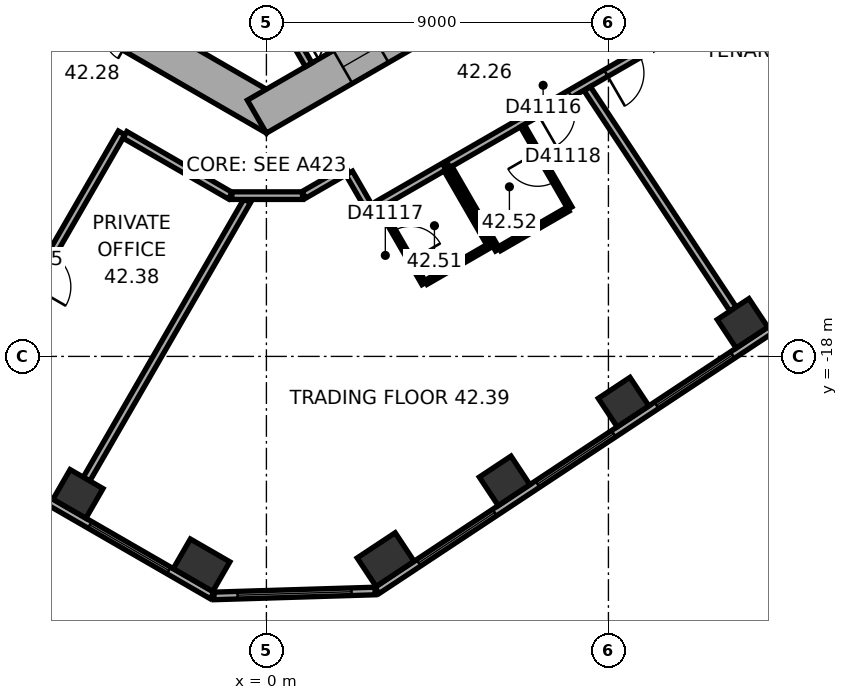
"""IFC4 building model, lengths in metres.
Left out: names, types, materials, properties, quantities, classifications, styles, units other than length and angle.
Written with IfcOpenShell. Run it as: python <this file> out.ifc"""

import sys

from ifc_helpers import new_model, si_unit, direction, frame, frame_2d, origin, origin_2d, place, context, subcontext, project, spatial, rectangle, extrude, element, fill, save


model = new_model("IFC4")
c1 = context("Model", 3, precision=1e-05, world=origin(), true_north=direction((0.0, 1.0)))
c2 = subcontext(c1, "Body", "Model", "MODEL_VIEW")
j1 = project(units=[si_unit("LENGTHUNIT", "METRE"), si_unit("PLANEANGLEUNIT", "RADIAN")], contexts=[c1])
p1 = place(None, origin())
s1 = spatial("IfcSite", under=j1, at=p1, CompositionType="ELEMENT")
p2 = place(p1, origin())
s2 = spatial("IfcBuilding", under=s1, at=p2, CompositionType="ELEMENT")
p3 = place(p2, frame((0.0, 0.0, 172.5)))
s3 = spatial("IfcBuildingStorey", under=s2, at=p3, CompositionType="ELEMENT", Elevation=172.5)
p4 = place(p3, frame((-4.958, -21.617, 0.0), z_axis=(0.0, 0.0, 1.0), x_axis=(0.866025403784, -0.5, 0.0)))
e1 = element("IfcColumn", 1, at=p4, inside=s3, PredefinedType="COLUMN", context=c2, shape_type="SweptSolid", body=[
    extrude(rectangle(XDim=1.0, YDim=0.9, at=origin_2d()), origin(), (0.0, 0.0, 1.0), 3.7),
])
for number, where, z_axis, x_axis in (
    (2, (-1.706, -23.494, 0.0), (0.0, 0.0, 1.0), (0.866, -0.5, 0.0)),
    (3, (3.137, -23.346, 0.0), (0.0, 0.0, 1.0), (0.834, 0.552, 0.0)),
):
    element("IfcColumn", number, at=place(p3, frame(where, z_axis=z_axis, x_axis=x_axis)), inside=s3, PredefinedType="COLUMN", context=c2, shape_type="SweptSolid", body=[
        extrude(rectangle(XDim=1.2, YDim=0.9, at=origin_2d()), origin(), (0.0, 0.0, 1.0), 3.7),
    ])
for number, where, z_axis, x_axis in (
    (4, (6.268, -21.274, 0.0), (0.0, 0.0, 1.0), (0.834, 0.552, 0.0)),
    (5, (9.398, -19.202, 0.0), (0.0, 0.0, 1.0), (0.834, 0.552, 0.0)),
    (6, (12.529, -17.13, 0.0), (0.0, 0.0, 1.0), (0.834, 0.552, 0.0)),
):
    element("IfcColumn", number, at=place(p3, frame(where, z_axis=z_axis, x_axis=x_axis)), inside=s3, PredefinedType="COLUMN", context=c2, shape_type="SweptSolid", body=[
        extrude(rectangle(XDim=1.0, YDim=0.9, at=origin_2d()), origin(), (0.0, 0.0, 1.0), 3.7),
    ])
p5 = place(p3, frame((-10.25, -5.629, 0.0), z_axis=(0.0, 0.0, 1.0), x_axis=(0.866022616891, -0.50000482701, 0.0)))
e7 = element("IfcWall", 7, at=p5, inside=s3, PredefinedType="SHEAR", context=c2, shape_type="SweptSolid", body=[
    extrude(rectangle(XDim=12.125, YDim=1.0, at=frame_2d((6.062, 0.0))), origin(), (0.0, 0.0, 1.0), 3.7),
])
p6 = place(p5, frame((6.262, 0.0, 0.0)))
e8 = element("IfcOpeningElement", 8, at=p6, cuts=e7, PredefinedType="OPENING", context=c2, shape_type="SweptSolid", body=[
    extrude(rectangle(XDim=1.5, YDim=2.1, at=frame_2d((0.75, 1.05))), frame((0.0, 0.51, 0.0), z_axis=(0.0, -1.0, 0.0), x_axis=(1.0, 0.0, 0.0)), (0.0, 0.0, 1.0), 1.02),
])
p7 = place(p5, frame((1.712, 0.0, 0.0)))
e9 = element("IfcOpeningElement", 9, at=p7, cuts=e7, PredefinedType="OPENING", context=c2, shape_type="SweptSolid", body=[
    extrude(rectangle(XDim=1.1, YDim=2.1, at=frame_2d((0.55, 1.05))), frame((0.0, 0.51, 0.0), z_axis=(0.0, -1.0, 0.0), x_axis=(1.0, 0.0, 0.0)), (0.0, 0.0, 1.0), 1.02),
])
p8 = place(p5, frame((4.312, 0.0, 0.0)))
e10 = element("IfcOpeningElement", 10, at=p8, cuts=e7, PredefinedType="OPENING", context=c2, shape_type="SweptSolid", body=[
    extrude(rectangle(XDim=1.1, YDim=2.1, at=frame_2d((0.55, 1.05))), frame((0.0, 0.51, 0.0), z_axis=(0.0, -1.0, 0.0), x_axis=(1.0, 0.0, 0.0)), (0.0, 0.0, 1.0), 1.02),
])
p9 = place(p3, frame((-0.25, -11.691, 0.0), z_axis=(0.0, 0.0, 1.0), x_axis=(0.866022616891, 0.50000482701, 0.0)))
e11 = element("IfcWall", 11, at=p9, inside=s3, PredefinedType="SHEAR", context=c2, shape_type="SweptSolid", body=[
    extrude(rectangle(XDim=12.125, YDim=1.0, at=frame_2d((6.062, 0.0))), origin(), (0.0, 0.0, 1.0), 3.7),
])
p10 = place(p9, frame((2.612, 0.0, 0.0)))
e12 = element("IfcOpeningElement", 12, at=p10, cuts=e11, PredefinedType="OPENING", context=c2, shape_type="SweptSolid", body=[
    extrude(rectangle(XDim=1.1, YDim=2.1, at=frame_2d((0.55, 1.05))), frame((0.0, 0.51, 0.0), z_axis=(0.0, -1.0, 0.0), x_axis=(1.0, 0.0, 0.0)), (0.0, 0.0, 1.0), 1.02),
])
p11 = place(p9, frame((5.212, 0.0, 0.0)))
e13 = element("IfcOpeningElement", 13, at=p11, cuts=e11, PredefinedType="OPENING", context=c2, shape_type="SweptSolid", body=[
    extrude(rectangle(XDim=1.1, YDim=2.1, at=frame_2d((0.55, 1.05))), frame((0.0, 0.51, 0.0), z_axis=(0.0, -1.0, 0.0), x_axis=(1.0, 0.0, 0.0)), (0.0, 0.0, 1.0), 1.02),
])
p12 = place(p9, frame((7.812, 0.0, 0.0)))
e14 = element("IfcOpeningElement", 14, at=p12, cuts=e11, PredefinedType="OPENING", context=c2, shape_type="SweptSolid", body=[
    extrude(rectangle(XDim=1.1, YDim=2.1, at=frame_2d((0.55, 1.05))), frame((0.0, 0.51, 0.0), z_axis=(0.0, -1.0, 0.0), x_axis=(1.0, 0.0, 0.0)), (0.0, 0.0, 1.0), 1.02),
])
p13 = place(p3, frame((-18.789, -14.267, 0.0), z_axis=(0.0, 0.0, 1.0), x_axis=(0.866023315909, -0.500003616288, 0.0)))
e15 = element("IfcWall", 15, at=p13, inside=s3, PredefinedType="STANDARD", context=c2, shape_type="SweptSolid", body=[
    extrude(rectangle(XDim=20.044, YDim=0.2, at=frame_2d((10.022, 0.0))), origin(), (0.0, 0.0, 1.0), 3.7),
])
p14 = place(p13, frame((1.314, 0.0, 0.9)))
e16 = element("IfcOpeningElement", 16, at=p14, cuts=e15, PredefinedType="OPENING", context=c2, shape_type="SweptSolid", body=[
    extrude(rectangle(XDim=2.4, YDim=2.0, at=frame_2d((1.2, 1.0))), frame((0.0, 0.11, 0.0), z_axis=(0.0, -1.0, 0.0), x_axis=(1.0, 0.0, 0.0)), (0.0, 0.0, 1.0), 0.22),
])
p15 = place(p13, frame((5.069, 0.0, 0.9)))
e17 = element("IfcOpeningElement", 17, at=p15, cuts=e15, PredefinedType="OPENING", context=c2, shape_type="SweptSolid", body=[
    extrude(rectangle(XDim=2.4, YDim=2.0, at=frame_2d((1.2, 1.0))), frame((0.0, 0.11, 0.0), z_axis=(0.0, -1.0, 0.0), x_axis=(1.0, 0.0, 0.0)), (0.0, 0.0, 1.0), 0.22),
])
p16 = place(p13, frame((8.823, 0.0, 0.9)))
e18 = element("IfcOpeningElement", 18, at=p16, cuts=e15, PredefinedType="OPENING", context=c2, shape_type="SweptSolid", body=[
    extrude(rectangle(XDim=2.4, YDim=2.0, at=frame_2d((1.2, 1.0))), frame((0.0, 0.11, 0.0), z_axis=(0.0, -1.0, 0.0), x_axis=(1.0, 0.0, 0.0)), (0.0, 0.0, 1.0), 0.22),
])
p17 = place(p13, frame((12.577, 0.0, 0.9)))
e19 = element("IfcOpeningElement", 19, at=p17, cuts=e15, PredefinedType="OPENING", context=c2, shape_type="SweptSolid", body=[
    extrude(rectangle(XDim=2.4, YDim=2.0, at=frame_2d((1.2, 1.0))), frame((0.0, 0.11, 0.0), z_axis=(0.0, -1.0, 0.0), x_axis=(1.0, 0.0, 0.0)), (0.0, 0.0, 1.0), 0.22),
])
p18 = place(p13, frame((16.331, 0.0, 0.9)))
e20 = element("IfcOpeningElement", 20, at=p18, cuts=e15, PredefinedType="OPENING", context=c2, shape_type="SweptSolid", body=[
    extrude(rectangle(XDim=2.4, YDim=2.0, at=frame_2d((1.2, 1.0))), frame((0.0, 0.11, 0.0), z_axis=(0.0, -1.0, 0.0), x_axis=(1.0, 0.0, 0.0)), (0.0, 0.0, 1.0), 0.22),
])
p19 = place(p3, frame((-1.378, -24.302, 0.0), z_axis=(0.0, 0.0, 1.0), x_axis=(0.999533857267, 0.030529791629, 0.0)))
e21 = element("IfcWall", 21, at=p19, inside=s3, PredefinedType="STANDARD", context=c2, shape_type="SweptSolid", body=[
    extrude(rectangle(XDim=4.238, YDim=0.2, at=frame_2d((2.119, 0.0))), origin(), (0.0, 0.0, 1.0), 3.7),
])
p20 = place(p19, frame((0.619, 0.0, 0.9)))
e22 = element("IfcOpeningElement", 22, at=p20, cuts=e21, PredefinedType="OPENING", context=c2, shape_type="SweptSolid", body=[
    extrude(rectangle(XDim=3.0, YDim=2.0, at=frame_2d((1.5, 1.0))), frame((0.0, 0.11, 0.0), z_axis=(0.0, -1.0, 0.0), x_axis=(1.0, 0.0, 0.0)), (0.0, 0.0, 1.0), 0.22),
])
p21 = place(p3, frame((2.911, -24.156, 0.0), z_axis=(0.0, 0.0, 1.0), x_axis=(0.833882163564, 0.551942512668, 0.0)))
e23 = element("IfcWall", 23, at=p21, inside=s3, PredefinedType="STANDARD", context=c2, shape_type="SweptSolid", body=[
    extrude(rectangle(XDim=20.044, YDim=0.2, at=frame_2d((10.022, 0.0))), origin(), (0.0, 0.0, 1.0), 3.7),
])
p22 = place(p21, frame((1.313, 0.0, 0.9)))
e24 = element("IfcOpeningElement", 24, at=p22, cuts=e23, PredefinedType="OPENING", context=c2, shape_type="SweptSolid", body=[
    extrude(rectangle(XDim=2.4, YDim=2.0, at=frame_2d((1.2, 1.0))), frame((0.0, 0.11, 0.0), z_axis=(0.0, -1.0, 0.0), x_axis=(1.0, 0.0, 0.0)), (0.0, 0.0, 1.0), 0.22),
])
p23 = place(p21, frame((5.067, 0.0, 0.9)))
e25 = element("IfcOpeningElement", 25, at=p23, cuts=e23, PredefinedType="OPENING", context=c2, shape_type="SweptSolid", body=[
    extrude(rectangle(XDim=2.4, YDim=2.0, at=frame_2d((1.2, 1.0))), frame((0.0, 0.11, 0.0), z_axis=(0.0, -1.0, 0.0), x_axis=(1.0, 0.0, 0.0)), (0.0, 0.0, 1.0), 0.22),
])
p24 = place(p21, frame((8.821, 0.0, 0.9)))
e26 = element("IfcOpeningElement", 26, at=p24, cuts=e23, PredefinedType="OPENING", context=c2, shape_type="SweptSolid", body=[
    extrude(rectangle(XDim=2.4, YDim=2.0, at=frame_2d((1.2, 1.0))), frame((0.0, 0.11, 0.0), z_axis=(0.0, -1.0, 0.0), x_axis=(1.0, 0.0, 0.0)), (0.0, 0.0, 1.0), 0.22),
])
p25 = place(p21, frame((12.575, 0.0, 0.9)))
e27 = element("IfcOpeningElement", 27, at=p25, cuts=e23, PredefinedType="OPENING", context=c2, shape_type="SweptSolid", body=[
    extrude(rectangle(XDim=2.4, YDim=2.0, at=frame_2d((1.2, 1.0))), frame((0.0, 0.11, 0.0), z_axis=(0.0, -1.0, 0.0), x_axis=(1.0, 0.0, 0.0)), (0.0, 0.0, 1.0), 0.22),
])
p26 = place(p21, frame((16.329, 0.0, 0.9)))
e28 = element("IfcOpeningElement", 28, at=p26, cuts=e23, PredefinedType="OPENING", context=c2, shape_type="SweptSolid", body=[
    extrude(rectangle(XDim=2.4, YDim=2.0, at=frame_2d((1.2, 1.0))), frame((0.0, 0.11, 0.0), z_axis=(0.0, -1.0, 0.0), x_axis=(1.0, 0.0, 0.0)), (0.0, 0.0, 1.0), 0.22),
])
p27 = place(p3, frame((0.013, -8.422, 0.0), z_axis=(0.0, 0.0, 1.0), x_axis=(0.500077893725, -0.86598042715, 0.0)))
e29 = element("IfcWall", 29, at=p27, inside=s3, PredefinedType="PARTITIONING", context=c2, shape_type="SweptSolid", body=[
    extrude(rectangle(XDim=2.2, YDim=0.2, at=frame_2d((1.1, 0.0))), origin(), (0.0, 0.0, 1.0), 3.42),
])
p28 = place(p3, frame((-7.984, -19.351, 0.0), z_axis=(0.0, 0.0, 1.0), x_axis=(0.500010139422, 0.866019549707, 0.0)))
e30 = element("IfcWall", 30, at=p28, inside=s3, PredefinedType="PARTITIONING", context=c2, shape_type="SweptSolid", body=[
    extrude(rectangle(XDim=8.35, YDim=0.2, at=frame_2d((4.175, 0.0))), origin(), (0.0, 0.0, 1.0), 3.42),
])
p29 = place(p28, frame((3.675, 0.0, 0.0)))
e31 = element("IfcOpeningElement", 31, at=p29, cuts=e30, PredefinedType="OPENING", context=c2, shape_type="SweptSolid", body=[
    extrude(rectangle(XDim=1.0, YDim=2.1, at=frame_2d((0.5, 1.05))), frame((0.0, 0.11, 0.0), z_axis=(0.0, -1.0, 0.0), x_axis=(1.0, 0.0, 0.0)), (0.0, 0.0, 1.0), 0.22),
])
p30 = place(p3, frame((-4.732, -21.228, 0.0), z_axis=(0.0, 0.0, 1.0), x_axis=(0.500000843414, 0.866024916838, 0.0)))
e32 = element("IfcWall", 32, at=p30, inside=s3, PredefinedType="PARTITIONING", context=c2, shape_type="SweptSolid", body=[
    extrude(rectangle(XDim=8.452, YDim=0.2, at=frame_2d((4.226, 0.0))), origin(), (0.0, 0.0, 1.0), 3.42),
])
p31 = place(p3, frame((-3.722, -12.169, 0.0), z_axis=(0.0, 0.0, 1.0), x_axis=(0.866033163891, -0.499986558861, 0.0)))
e33 = element("IfcWall", 33, at=p31, inside=s3, PredefinedType="PARTITIONING", context=c2, shape_type="SweptSolid", body=[
    extrude(rectangle(XDim=3.201, YDim=0.2, at=frame_2d((1.6, 0.0))), origin(), (0.0, 0.0, 1.0), 3.42),
])
p32 = place(p3, frame((-0.91, -13.77, 0.0), z_axis=(0.0, 0.0, 1.0), x_axis=(1.0, 0.0, 0.0)))
e34 = element("IfcWall", 34, at=p32, inside=s3, PredefinedType="PARTITIONING", context=c2, shape_type="SweptSolid", body=[
    extrude(rectangle(XDim=1.86, YDim=0.2, at=frame_2d((0.93, 0.0))), origin(), (0.0, 0.0, 1.0), 3.42),
])
p33 = place(p3, frame((0.985, -13.75, 0.0), z_axis=(0.0, 0.0, 1.0), x_axis=(0.866028661061, 0.499994358189, 0.0)))
e35 = element("IfcWall", 35, at=p33, inside=s3, PredefinedType="PARTITIONING", context=c2, shape_type="SweptSolid", body=[
    extrude(rectangle(XDim=1.321, YDim=0.2, at=frame_2d((0.661, 0.0))), origin(), (0.0, 0.0, 1.0), 3.42),
])
p34 = place(p3, frame((2.179, -13.176, 0.0), z_axis=(0.0, 0.0, 1.0), x_axis=(0.499978356969, -0.866037899034, 0.0)))
e36 = element("IfcWall", 36, at=p34, inside=s3, PredefinedType="PARTITIONING", context=c2, shape_type="SweptSolid", body=[
    extrude(rectangle(XDim=1.101, YDim=0.2, at=frame_2d((0.551, 0.0))), origin(), (0.0, 0.0, 1.0), 3.42),
])
p35 = place(p3, frame((2.946, -14.004, 0.0), z_axis=(0.0, 0.0, 1.0), x_axis=(0.866041268327, 0.499972520799, 0.0)))
e37 = element("IfcWall", 37, at=p35, inside=s3, PredefinedType="PARTITIONING", context=c2, shape_type="SweptSolid", body=[
    extrude(rectangle(XDim=2.0, YDim=0.2, at=frame_2d((1.0, 0.0))), origin(), (0.0, 0.0, 1.0), 3.42),
])
p36 = place(p3, frame((4.146, -16.083, 0.0), z_axis=(0.0, 0.0, 1.0), x_axis=(-0.499952165731, 0.866053019151, 0.0)))
e38 = element("IfcWall", 38, at=p36, inside=s3, PredefinedType="PARTITIONING", context=c2, shape_type="SweptSolid", body=[
    extrude(rectangle(XDim=2.3, YDim=0.12, at=frame_2d((1.15, 0.0))), origin(), (0.0, 0.0, 1.0), 3.42),
])
p37 = place(p36, frame((0.7, 0.0, 0.0)))
e39 = element("IfcOpeningElement", 39, at=p37, cuts=e38, PredefinedType="OPENING", context=c2, shape_type="SweptSolid", body=[
    extrude(rectangle(XDim=0.9, YDim=2.1, at=frame_2d((0.45, 1.05))), frame((0.0, 0.07, 0.0), z_axis=(0.0, -1.0, 0.0), x_axis=(1.0, 0.0, 0.0)), (0.0, 0.0, 1.0), 0.14),
])
p38 = place(p3, frame((4.728, -13.091, 0.0), z_axis=(0.0, 0.0, 1.0), x_axis=(0.500031774688, -0.866007057882, 0.0)))
e40 = element("IfcWall", 40, at=p38, inside=s3, PredefinedType="PARTITIONING", context=c2, shape_type="SweptSolid", body=[
    extrude(rectangle(XDim=2.3, YDim=0.12, at=frame_2d((1.15, 0.0))), origin(), (0.0, 0.0, 1.0), 3.42),
])
p39 = place(p3, frame((4.782, -12.944, 0.0), z_axis=(0.0, 0.0, 1.0), x_axis=(0.866022506829, 0.50000501764, 0.0)))
e41 = element("IfcWall", 41, at=p39, inside=s3, PredefinedType="PARTITIONING", context=c2, shape_type="SweptSolid", body=[
    extrude(rectangle(XDim=6.432, YDim=0.2, at=frame_2d((3.216, 0.0))), origin(), (0.0, 0.0, 1.0), 3.42),
])
p40 = place(p39, frame((2.704, 0.0, 0.0)))
e42 = element("IfcOpeningElement", 42, at=p40, cuts=e41, PredefinedType="OPENING", context=c2, shape_type="SweptSolid", body=[
    extrude(rectangle(XDim=1.0, YDim=2.1, at=frame_2d((0.5, 1.05))), frame((0.0, 0.11, 0.0), z_axis=(0.0, -1.0, 0.0), x_axis=(1.0, 0.0, 0.0)), (0.0, 0.0, 1.0), 0.22),
])
p41 = place(p39, frame((4.795, 0.0, 0.0)))
e43 = element("IfcOpeningElement", 43, at=p41, cuts=e41, PredefinedType="OPENING", context=c2, shape_type="SweptSolid", body=[
    extrude(rectangle(XDim=1.0, YDim=2.1, at=frame_2d((0.5, 1.05))), frame((0.0, 0.11, 0.0), z_axis=(0.0, -1.0, 0.0), x_axis=(1.0, 0.0, 0.0)), (0.0, 0.0, 1.0), 0.22),
])
p42 = place(p3, frame((5.826, -15.113, 0.0), z_axis=(0.0, 0.0, 1.0), x_axis=(-0.866045024864, -0.499966013754, 0.0)))
e44 = element("IfcWall", 44, at=p42, inside=s3, PredefinedType="PARTITIONING", context=c2, shape_type="SweptSolid", body=[
    extrude(rectangle(XDim=1.88, YDim=0.12, at=frame_2d((0.94, 0.0))), origin(), (0.0, 0.0, 1.0), 3.42),
])
p43 = place(p3, frame((6.082, -15.196, 0.0), z_axis=(0.0, 0.0, 1.0), x_axis=(-0.500004234368, 0.866022959057, 0.0)))
e45 = element("IfcWall", 45, at=p43, inside=s3, PredefinedType="PARTITIONING", context=c2, shape_type="SweptSolid", body=[
    extrude(rectangle(XDim=2.5, YDim=0.12, at=frame_2d((1.25, 0.0))), origin(), (0.0, 0.0, 1.0), 3.42),
])
p44 = place(p3, frame((6.737, -11.931, 0.0), z_axis=(0.0, 0.0, 1.0), x_axis=(0.500004234368, -0.866022959057, 0.0)))
e46 = element("IfcWall", 46, at=p44, inside=s3, PredefinedType="PARTITIONING", context=c2, shape_type="SweptSolid", body=[
    extrude(rectangle(XDim=2.5, YDim=0.12, at=frame_2d((1.25, 0.0))), origin(), (0.0, 0.0, 1.0), 3.42),
])
p45 = place(p44, frame((0.8, 0.0, 0.0)))
e47 = element("IfcOpeningElement", 47, at=p45, cuts=e46, PredefinedType="OPENING", context=c2, shape_type="SweptSolid", body=[
    extrude(rectangle(XDim=0.9, YDim=2.1, at=frame_2d((0.45, 1.05))), frame((0.0, 0.07, 0.0), z_axis=(0.0, -1.0, 0.0), x_axis=(1.0, 0.0, 0.0)), (0.0, 0.0, 1.0), 0.14),
])
p46 = place(p3, frame((7.935, -14.126, 0.0), z_axis=(0.0, 0.0, 1.0), x_axis=(-0.866009661879, -0.500027264788, 0.0)))
e48 = element("IfcWall", 48, at=p46, inside=s3, PredefinedType="PARTITIONING", context=c2, shape_type="SweptSolid", body=[
    extrude(rectangle(XDim=2.08, YDim=0.12, at=frame_2d((1.04, 0.0))), origin(), (0.0, 0.0, 1.0), 3.42),
])
p47 = place(p3, frame((12.281, -16.755, 0.0), z_axis=(0.0, 0.0, 1.0), x_axis=(-0.551925794663, 0.833893228888, 0.0)))
e49 = element("IfcWall", 49, at=p47, inside=s3, PredefinedType="PARTITIONING", context=c2, shape_type="SweptSolid", body=[
    extrude(rectangle(XDim=6.953, YDim=0.2, at=frame_2d((3.476, 0.0))), origin(), (0.0, 0.0, 1.0), 3.42),
])
p48 = place(p18, origin())
e50 = element("IfcWindow", 50, at=p48, inside=s3, PartitioningType="SINGLE_PANEL", PredefinedType="WINDOW", context=c2, shape_type="SweptSolid", body=[
    extrude(rectangle(XDim=2.4, YDim=2.0, at=frame_2d((1.2, 1.0))), frame((0.0, 0.03, 0.0), z_axis=(0.0, -1.0, 0.0), x_axis=(1.0, 0.0, 0.0)), (0.0, 0.0, 1.0), 0.06),
])
fill(e20, e50)
p49 = place(p20, origin())
e51 = element("IfcWindow", 51, at=p49, inside=s3, PartitioningType="SINGLE_PANEL", PredefinedType="WINDOW", context=c2, shape_type="SweptSolid", body=[
    extrude(rectangle(XDim=3.0, YDim=2.0, at=frame_2d((1.5, 1.0))), frame((0.0, 0.03, 0.0), z_axis=(0.0, -1.0, 0.0), x_axis=(1.0, 0.0, 0.0)), (0.0, 0.0, 1.0), 0.06),
])
fill(e22, e51)
p50 = place(p22, origin())
e52 = element("IfcWindow", 52, at=p50, inside=s3, PartitioningType="SINGLE_PANEL", PredefinedType="WINDOW", context=c2, shape_type="SweptSolid", body=[
    extrude(rectangle(XDim=2.4, YDim=2.0, at=frame_2d((1.2, 1.0))), frame((0.0, 0.03, 0.0), z_axis=(0.0, -1.0, 0.0), x_axis=(1.0, 0.0, 0.0)), (0.0, 0.0, 1.0), 0.06),
])
fill(e24, e52)
p51 = place(p23, origin())
e53 = element("IfcWindow", 53, at=p51, inside=s3, PartitioningType="SINGLE_PANEL", PredefinedType="WINDOW", context=c2, shape_type="SweptSolid", body=[
    extrude(rectangle(XDim=2.4, YDim=2.0, at=frame_2d((1.2, 1.0))), frame((0.0, 0.03, 0.0), z_axis=(0.0, -1.0, 0.0), x_axis=(1.0, 0.0, 0.0)), (0.0, 0.0, 1.0), 0.06),
])
fill(e25, e53)
p52 = place(p24, origin())
e54 = element("IfcWindow", 54, at=p52, inside=s3, PartitioningType="SINGLE_PANEL", PredefinedType="WINDOW", context=c2, shape_type="SweptSolid", body=[
    extrude(rectangle(XDim=2.4, YDim=2.0, at=frame_2d((1.2, 1.0))), frame((0.0, 0.03, 0.0), z_axis=(0.0, -1.0, 0.0), x_axis=(1.0, 0.0, 0.0)), (0.0, 0.0, 1.0), 0.06),
])
fill(e26, e54)
p53 = place(p10, origin())
e55 = element("IfcDoor", 55, at=p53, inside=s3, OperationType="DOUBLE_DOOR_SLIDING", PredefinedType="DOOR", context=c2, shape_type="SweptSolid", body=[
    extrude(rectangle(XDim=1.1, YDim=2.1, at=frame_2d((0.55, 1.05))), frame((0.0, 0.025, 0.0), z_axis=(0.0, -1.0, 0.0), x_axis=(1.0, 0.0, 0.0)), (0.0, 0.0, 1.0), 0.05),
])
fill(e12, e55)
p54 = place(p29, origin())
e56 = element("IfcDoor", 56, at=p54, inside=s3, OperationType="SINGLE_SWING_LEFT", PredefinedType="DOOR", context=c2, shape_type="SweptSolid", body=[
    extrude(rectangle(XDim=1.0, YDim=2.1, at=frame_2d((0.5, 1.05))), frame((0.0, 0.025, 0.0), z_axis=(0.0, -1.0, 0.0), x_axis=(1.0, 0.0, 0.0)), (0.0, 0.0, 1.0), 0.05),
])
fill(e31, e56)
p55 = place(p40, origin())
e57 = element("IfcDoor", 57, at=p55, inside=s3, OperationType="SINGLE_SWING_LEFT", PredefinedType="DOOR", context=c2, shape_type="SweptSolid", body=[
    extrude(rectangle(XDim=1.0, YDim=2.1, at=frame_2d((0.5, 1.05))), frame((0.0, 0.025, 0.0), z_axis=(0.0, -1.0, 0.0), x_axis=(1.0, 0.0, 0.0)), (0.0, 0.0, 1.0), 0.05),
])
fill(e42, e57)
p56 = place(p37, origin())
e58 = element("IfcDoor", 58, at=p56, inside=s3, OperationType="SINGLE_SWING_LEFT", PredefinedType="DOOR", context=c2, shape_type="SweptSolid", body=[
    extrude(rectangle(XDim=0.9, YDim=2.1, at=frame_2d((0.45, 1.05))), frame((0.0, 0.025, 0.0), z_axis=(0.0, -1.0, 0.0), x_axis=(1.0, 0.0, 0.0)), (0.0, 0.0, 1.0), 0.05),
])
fill(e39, e58)
p57 = place(p45, origin())
e59 = element("IfcDoor", 59, at=p57, inside=s3, OperationType="SINGLE_SWING_LEFT", PredefinedType="DOOR", context=c2, shape_type="SweptSolid", body=[
    extrude(rectangle(XDim=0.9, YDim=2.1, at=frame_2d((0.45, 1.05))), frame((0.0, 0.025, 0.0), z_axis=(0.0, -1.0, 0.0), x_axis=(1.0, 0.0, 0.0)), (0.0, 0.0, 1.0), 0.05),
])
fill(e47, e59)
p58 = place(p41, origin())
e60 = element("IfcDoor", 60, at=p58, inside=s3, OperationType="SINGLE_SWING_LEFT", PredefinedType="DOOR", context=c2, shape_type="SweptSolid", body=[
    extrude(rectangle(XDim=1.0, YDim=2.1, at=frame_2d((0.5, 1.05))), frame((0.0, 0.025, 0.0), z_axis=(0.0, -1.0, 0.0), x_axis=(1.0, 0.0, 0.0)), (0.0, 0.0, 1.0), 0.05),
])
fill(e43, e60)
save(model, sys.argv[1])
